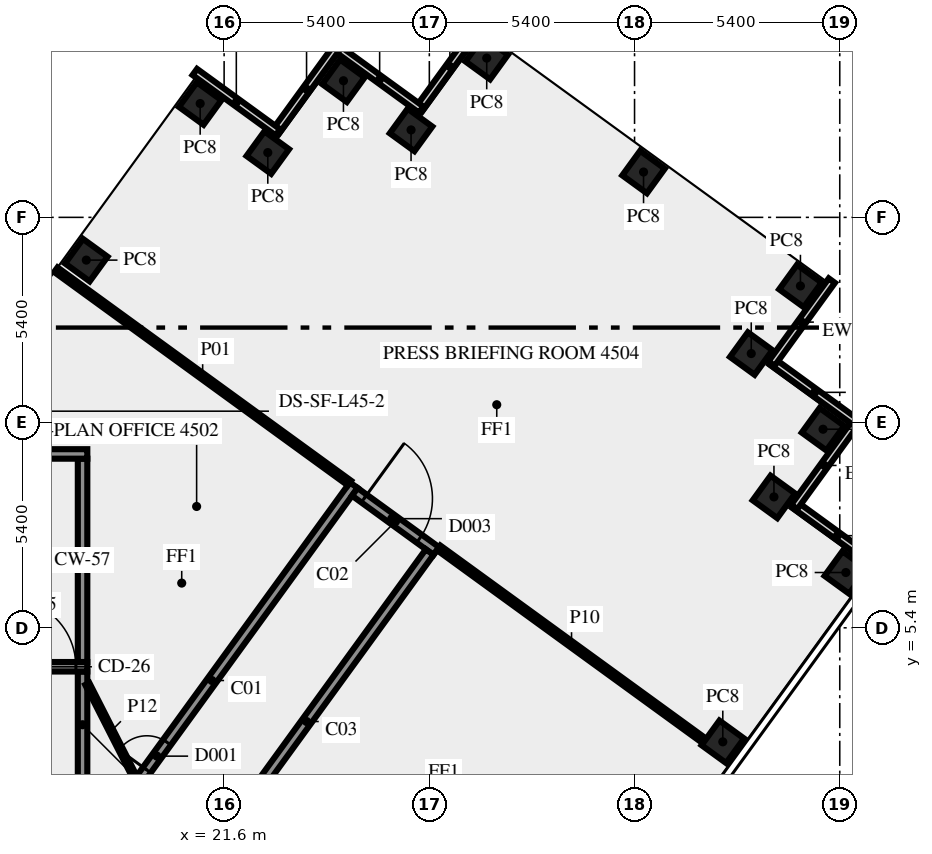
"""IFC4 building model, lengths in metres.
Left out: names, types, materials, properties, quantities, classifications, styles, units other than length and angle.
Written with IfcOpenShell. Run it as: python <this file> out.ifc"""

import sys

from ifc_helpers import new_model, si_unit, direction, frame, frame_2d, origin, origin_2d, place, context, subcontext, project, spatial, rectangle, extrude, element, fill, save


model = new_model("IFC4")
c1 = context("Model", 3, precision=1e-05, world=origin(), true_north=direction((0.0, 1.0)))
c2 = subcontext(c1, "Body", "Model", "MODEL_VIEW")
j1 = project(units=[si_unit("LENGTHUNIT", "METRE"), si_unit("PLANEANGLEUNIT", "RADIAN")], contexts=[c1])
p1 = place(None, origin())
s1 = spatial("IfcSite", under=j1, at=p1, CompositionType="ELEMENT")
p2 = place(p1, origin())
s2 = spatial("IfcBuilding", under=s1, at=p2, CompositionType="ELEMENT")
p3 = place(p2, frame((0.0, 0.0, 194.0)))
s3 = spatial("IfcBuildingStorey", under=s2, at=p3, CompositionType="ELEMENT", Elevation=194.0)
for number, where, z_axis, x_axis in (
    (1, (34.722, 2.4, 0.0), (0.0, 0.0, 1.0), (0.588, 0.809, 0.0)),
    (2, (37.96, 6.855, 0.0), (0.0, 0.0, 1.0), (0.588, 0.809, 0.0)),
    (3, (36.068, 8.844, 0.0), (0.0, 0.0, 1.0), (0.588, 0.809, 0.0)),
    (4, (37.36, 10.625, 0.0), (0.0, 0.0, 1.0), (0.588, 0.809, 0.0)),
    (5, (35.471, 12.616, 0.0), (0.0, 0.0, 1.0), (-0.809, 0.588, 0.0)),
    (6, (36.765, 14.395, 0.0), (0.0, 0.0, 1.0), (-0.809, 0.588, 0.0)),
    (7, (32.637, 17.393, 0.0), (0.0, 0.0, 1.0), (-0.809, 0.588, 0.0)),
    (8, (28.51, 20.39, 0.0), (0.0, 0.0, 1.0), (-0.588, -0.809, 0.0)),
    (9, (26.519, 18.5, 0.0), (0.0, 0.0, 1.0), (-0.809, 0.588, 0.0)),
    (10, (24.74, 19.795, 0.0), (0.0, 0.0, 1.0), (-0.588, -0.809, 0.0)),
    (11, (22.749, 17.904, 0.0), (0.0, 0.0, 1.0), (-0.588, -0.809, 0.0)),
    (12, (20.97, 19.195, 0.0), (0.0, 0.0, 1.0), (-0.588, -0.809, 0.0)),
    (13, (17.974, 15.075, 0.0), (0.0, 0.0, 1.0), (-0.588, -0.809, 0.0)),
):
    element("IfcColumn", number, at=place(p3, frame(where, z_axis=z_axis, x_axis=x_axis)), inside=s3, PredefinedType="COLUMN", context=c2, shape_type="SweptSolid", body=[
        extrude(rectangle(XDim=0.8, YDim=0.8, at=origin_2d()), origin(), (0.0, 0.0, 1.0), 3.65),
    ])
for number, where, z_axis, x_axis in (
    (14, (38.829, 7.031, 0.0), (0.0, 0.0, 1.0), (-0.809, 0.588, 0.0)),
    (15, (36.602, 8.58, 0.0), (0.0, 0.0, 1.0), (0.588, 0.809, 0.0)),
    (16, (38.231, 10.802, 0.0), (0.0, 0.0, 1.0), (-0.809, 0.588, 0.0)),
    (17, (36.005, 12.352, 0.0), (0.0, 0.0, 1.0), (0.588, 0.809, 0.0)),
    (18, (28.334, 21.262, 0.0), (0.0, 0.0, 1.0), (-0.588, -0.809, 0.0)),
):
    element("IfcWall", number, at=place(p3, frame(where, z_axis=z_axis, x_axis=x_axis)), inside=s3, PredefinedType="SOLIDWALL", context=c2, shape_type="SweptSolid", body=[
        extrude(rectangle(XDim=2.7, YDim=0.2, at=frame_2d((1.35, 0.0))), origin(), (0.0, 0.0, 1.0), 3.65),
    ])
p4 = place(p3, frame((26.785, 19.036, 0.0), z_axis=(0.0, 0.0, 1.0), x_axis=(-0.809064397168, 0.587720002413, 0.0)))
e19 = element("IfcWall", 19, at=p4, inside=s3, PredefinedType="SOLIDWALL", context=c2, shape_type="SweptSolid", body=[
    extrude(rectangle(XDim=2.7, YDim=0.2, at=frame_2d((1.35, 0.0))), origin(), (0.0, 0.0, 1.0), 3.65),
])
for number, where, z_axis, x_axis in (
    (20, (24.563, 20.665, 0.0), (0.0, 0.0, 1.0), (-0.588, -0.809, 0.0)),
    (21, (23.013, 18.438, 0.0), (0.0, 0.0, 1.0), (-0.809, 0.588, 0.0)),
):
    element("IfcWall", number, at=place(p3, frame(where, z_axis=z_axis, x_axis=x_axis)), inside=s3, PredefinedType="SOLIDWALL", context=c2, shape_type="SweptSolid", body=[
        extrude(rectangle(XDim=2.7, YDim=0.2, at=frame_2d((1.35, 0.0))), origin(), (0.0, 0.0, 1.0), 3.65),
    ])
p5 = place(p3, frame((17.875, 1.45, 0.0), z_axis=(0.0, 0.0, 1.0), x_axis=(0.0, 1.0, 0.0)))
e22 = element("IfcWall", 22, at=p5, inside=s3, PredefinedType="SHEAR", context=c2, shape_type="SweptSolid", body=[
    extrude(rectangle(XDim=2.8, YDim=0.25, at=frame_2d((1.4, 0.0))), origin(), (0.0, 0.0, 1.0), 3.65),
])
p6 = place(p3, frame((7.5, 4.375, 0.0), z_axis=(0.0, 0.0, 1.0), x_axis=(1.0, 0.0, 0.0)))
e23 = element("IfcWall", 23, at=p6, inside=s3, PredefinedType="SHEAR", context=c2, shape_type="SweptSolid", body=[
    extrude(rectangle(XDim=10.5, YDim=0.25, at=frame_2d((5.25, 0.0))), origin(), (0.0, 0.0, 1.0), 3.65),
])
p7 = place(p6, frame((8.4, 0.0, 0.0)))
e24 = element("IfcOpeningElement", 24, at=p7, cuts=e23, PredefinedType="OPENING", context=c2, shape_type="SweptSolid", body=[
    extrude(rectangle(XDim=1.8, YDim=2.1, at=frame_2d((0.9, 1.05))), frame((0.0, 0.135, 0.0), z_axis=(0.0, -1.0, 0.0), x_axis=(1.0, 0.0, 0.0)), (0.0, 0.0, 1.0), 0.27),
])
p8 = place(p3, frame((17.875, 4.5, 0.0), z_axis=(0.0, 0.0, 1.0), x_axis=(0.0, 1.0, 0.0)))
e25 = element("IfcWall", 25, at=p8, inside=s3, PredefinedType="SHEAR", context=c2, shape_type="SweptSolid", body=[
    extrude(rectangle(XDim=5.35, YDim=0.25, at=frame_2d((2.675, 0.0))), origin(), (0.0, 0.0, 1.0), 3.65),
])
p9 = place(p3, frame((7.5, 9.975, 0.0), z_axis=(0.0, 0.0, 1.0), x_axis=(1.0, 0.0, 0.0)))
e26 = element("IfcWall", 26, at=p9, inside=s3, PredefinedType="SHEAR", context=c2, shape_type="SweptSolid", body=[
    extrude(rectangle(XDim=10.5, YDim=0.25, at=frame_2d((5.25, 0.0))), origin(), (0.0, 0.0, 1.0), 3.65),
])
p10 = place(p9, frame((2.0, 0.0, 1.0)))
e27 = element("IfcOpeningElement", 27, at=p10, cuts=e26, PredefinedType="OPENING", context=c2, shape_type="SweptSolid", body=[
    extrude(rectangle(XDim=1.2, YDim=1.2, at=frame_2d((0.6, 0.6))), frame((0.0, 0.135, 0.0), z_axis=(0.0, -1.0, 0.0), x_axis=(1.0, 0.0, 0.0)), (0.0, 0.0, 1.0), 0.27),
])
p11 = place(p3, frame((17.545, -1.125, 0.0), z_axis=(0.0, 0.0, 1.0), x_axis=(0.587796810203, 0.809008596935, 0.0)))
e28 = element("IfcWall", 28, at=p11, inside=s3, PredefinedType="SOLIDWALL", context=c2, shape_type="SweptSolid", body=[
    extrude(rectangle(XDim=12.703, YDim=0.25, at=frame_2d((6.352, 0.0))), origin(), (0.0, 0.0, 1.0), 3.65),
])
p12 = place(p11, frame((3.441, 0.0, 0.0)))
e29 = element("IfcOpeningElement", 29, at=p12, cuts=e28, PredefinedType="OPENING", context=c2, shape_type="SweptSolid", body=[
    extrude(rectangle(XDim=0.9, YDim=2.1, at=frame_2d((0.45, 1.05))), frame((0.0, 0.135, 0.0), z_axis=(0.0, -1.0, 0.0), x_axis=(1.0, 0.0, 0.0)), (0.0, 0.0, 1.0), 0.27),
])
p13 = place(p3, frame((25.039, 8.978, 0.0), z_axis=(0.0, 0.0, 1.0), x_axis=(0.809006914995, -0.587799125119, 0.0)))
e30 = element("IfcWall", 30, at=p13, inside=s3, PredefinedType="SOLIDWALL", context=c2, shape_type="SweptSolid", body=[
    extrude(rectangle(XDim=2.65, YDim=0.25, at=frame_2d((1.325, 0.0))), origin(), (0.0, 0.0, 1.0), 3.65),
])
p14 = place(p13, frame((0.301, 0.0, 0.0)))
e31 = element("IfcOpeningElement", 31, at=p14, cuts=e30, PredefinedType="OPENING", context=c2, shape_type="SweptSolid", body=[
    extrude(rectangle(XDim=1.8, YDim=2.1, at=frame_2d((0.9, 1.05))), frame((0.0, 0.135, 0.0), z_axis=(0.0, -1.0, 0.0), x_axis=(1.0, 0.0, 0.0)), (0.0, 0.0, 1.0), 0.27),
])
p15 = place(p3, frame((27.009, 7.392, 0.0), z_axis=(0.0, 0.0, 1.0), x_axis=(-0.587776457057, -0.809023384414, 0.0)))
e32 = element("IfcWall", 32, at=p15, inside=s3, PredefinedType="SOLIDWALL", context=c2, shape_type="SweptSolid", body=[
    extrude(rectangle(XDim=11.021, YDim=0.25, at=frame_2d((5.51, 0.0))), origin(), (0.0, 0.0, 1.0), 3.65),
])
p16 = place(p15, frame((9.588, 0.0, 0.0)))
e33 = element("IfcOpeningElement", 33, at=p16, cuts=e32, PredefinedType="OPENING", context=c2, shape_type="SweptSolid", body=[
    extrude(rectangle(XDim=0.9, YDim=2.1, at=frame_2d((0.45, 1.05))), frame((0.0, 0.135, 0.0), z_axis=(0.0, -1.0, 0.0), x_axis=(1.0, 0.0, 0.0)), (0.0, 0.0, 1.0), 0.27),
])
p17 = place(p3, frame((24.898, 9.209, 0.0), z_axis=(0.0, 0.0, 1.0), x_axis=(-0.809013490065, 0.587790075531, 0.0)))
e34 = element("IfcWall", 34, at=p17, inside=s3, PredefinedType="PARTITIONING", context=c2, shape_type="SweptSolid", body=[
    extrude(rectangle(XDim=9.549, YDim=0.15, at=frame_2d((4.775, 0.0))), origin(), (0.0, 0.0, 1.0), 2.85),
])
p18 = place(p3, frame((34.239, 2.423, 0.0), z_axis=(0.0, 0.0, 1.0), x_axis=(-0.809024209643, 0.5877753212, 0.0)))
e35 = element("IfcWall", 35, at=p18, inside=s3, PredefinedType="PARTITIONING", context=c2, shape_type="SweptSolid", body=[
    extrude(rectangle(XDim=8.645, YDim=0.15, at=frame_2d((4.322, 0.0))), origin(), (0.0, 0.0, 1.0), 3.65),
])
p19 = place(p3, frame((18.0, 3.925, 0.0), z_axis=(0.0, 0.0, 1.0), x_axis=(0.453950796792, -0.891026752736, 0.0)))
e36 = element("IfcWall", 36, at=p19, inside=s3, PredefinedType="PARTITIONING", context=c2, shape_type="SweptSolid", body=[
    extrude(rectangle(XDim=2.778, YDim=0.12, at=frame_2d((1.389, 0.0))), origin(), (0.0, 0.0, 1.0), 3.65),
])
p20 = place(p7, origin())
e37 = element("IfcDoor", 37, at=p20, inside=s3, OperationType="DOUBLE_DOOR_SINGLE_SWING", PredefinedType="DOOR", context=c2, shape_type="SweptSolid", body=[
    extrude(rectangle(XDim=1.8, YDim=2.1, at=frame_2d((0.9, 1.05))), frame((0.0, 0.025, 0.0), z_axis=(0.0, -1.0, 0.0), x_axis=(1.0, 0.0, 0.0)), (0.0, 0.0, 1.0), 0.05),
])
fill(e24, e37)
p21 = place(p12, origin())
e38 = element("IfcDoor", 38, at=p21, inside=s3, OperationType="SINGLE_SWING_LEFT", PredefinedType="DOOR", context=c2, shape_type="SweptSolid", body=[
    extrude(rectangle(XDim=0.9, YDim=2.1, at=frame_2d((0.45, 1.05))), frame((0.0, 0.025, 0.0), z_axis=(0.0, -1.0, 0.0), x_axis=(1.0, 0.0, 0.0)), (0.0, 0.0, 1.0), 0.05),
])
fill(e29, e38)
p22 = place(p14, origin())
e39 = element("IfcDoor", 39, at=p22, inside=s3, OperationType="DOUBLE_DOOR_SINGLE_SWING", PredefinedType="DOOR", context=c2, shape_type="SweptSolid", body=[
    extrude(rectangle(XDim=1.8, YDim=2.1, at=frame_2d((0.9, 1.05))), frame((0.0, 0.025, 0.0), z_axis=(0.0, -1.0, 0.0), x_axis=(1.0, 0.0, 0.0)), (0.0, 0.0, 1.0), 0.05),
])
fill(e31, e39)
save(model, sys.argv[1])
